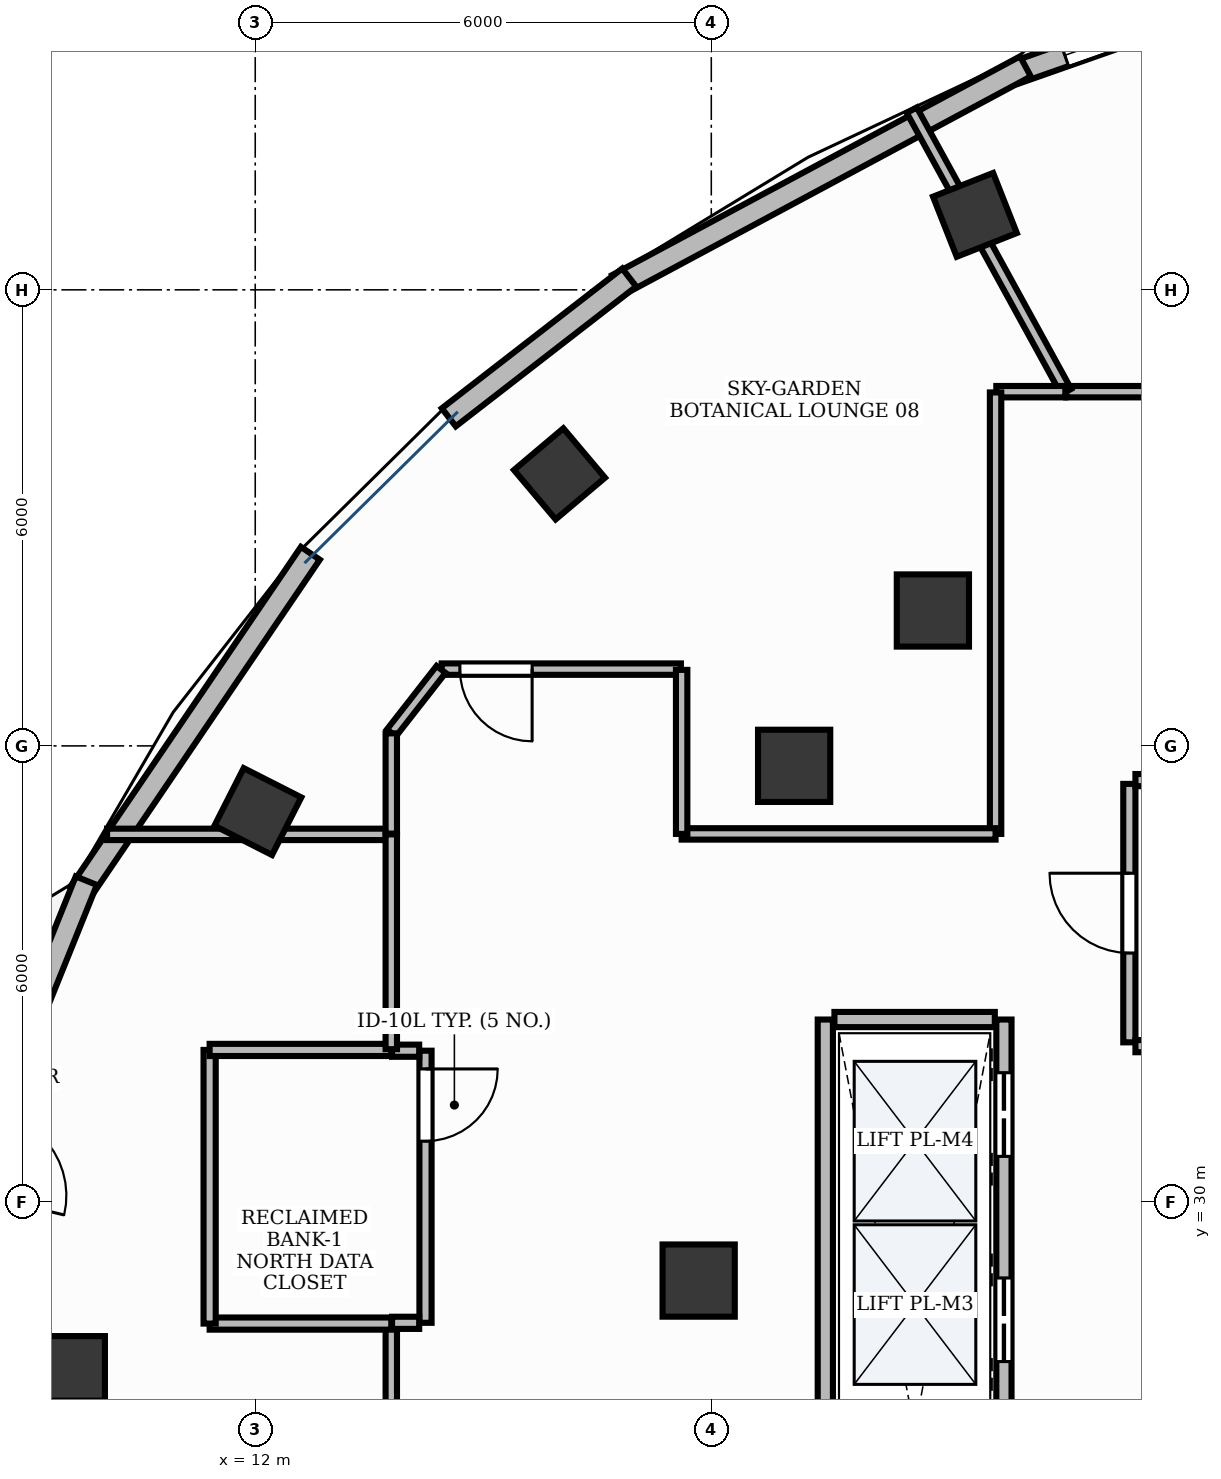
"""IFC4 building model, lengths in metres.
Left out: names, types, materials, properties, quantities, classifications, styles, units other than length and angle.
Written with IfcOpenShell. Run it as: python <this file> out.ifc"""

import sys

from ifc_helpers import new_model, si_unit, direction, frame, frame_2d, origin, origin_2d, place, context, subcontext, project, spatial, rectangle, extrude, element, fill, save


model = new_model("IFC4")
c1 = context("Model", 3, precision=1e-05, world=origin(), true_north=direction((0.0, 1.0)))
c2 = subcontext(c1, "Body", "Model", "MODEL_VIEW")
j1 = project(units=[si_unit("LENGTHUNIT", "METRE"), si_unit("PLANEANGLEUNIT", "RADIAN")], contexts=[c1])
p1 = place(None, origin())
s1 = spatial("IfcSite", under=j1, at=p1, CompositionType="ELEMENT")
p2 = place(p1, origin())
s2 = spatial("IfcBuilding", under=s1, at=p2, CompositionType="ELEMENT")
p3 = place(p2, frame((0.0, 0.0, 273.0)))
s3 = spatial("IfcBuildingStorey", under=s2, at=p3, CompositionType="ELEMENT", Elevation=273.0)
for number, where, z_axis, x_axis in (
    (1, (21.469, 42.986, -0.0), (0.0, 0.0, 1.0), (0.93, 0.367, 0.0)),
    (2, (16.003, 39.579, -0.0), (0.0, 0.0, 1.0), (0.764, 0.645, 0.0)),
):
    element("IfcColumn", number, at=place(p3, frame(where, z_axis=z_axis, x_axis=x_axis)), inside=s3, PredefinedType="COLUMN", context=c2, shape_type="SweptSolid", body=[
        extrude(rectangle(XDim=0.85, YDim=0.85, at=origin_2d()), origin(), (0.0, 0.0, 1.0), 3.881),
    ])
p4 = place(p3, frame((20.915, 37.781, -0.0), z_axis=(0.0, 0.0, 1.0), x_axis=(1.0, 0.0, 0.0)))
e3 = element("IfcColumn", 3, at=p4, inside=s3, PredefinedType="COLUMN", context=c2, shape_type="SweptSolid", body=[
    extrude(rectangle(XDim=0.95, YDim=0.95, at=origin_2d()), origin(), (0.0, 0.0, 1.0), 3.881),
])
p5 = place(p3, frame((12.034, 35.136, -0.0), z_axis=(0.0, 0.0, 1.0), x_axis=(0.453057191132, 0.891481453292, 0.0)))
e4 = element("IfcColumn", 4, at=p5, inside=s3, PredefinedType="COLUMN", context=c2, shape_type="SweptSolid", body=[
    extrude(rectangle(XDim=0.85, YDim=0.85, at=origin_2d()), origin(), (0.0, 0.0, 1.0), 3.881),
])
p6 = place(p3, frame((19.09, 35.738, -0.0), z_axis=(0.0, 0.0, 1.0), x_axis=(1.0, 0.0, 0.0)))
e5 = element("IfcColumn", 5, at=p6, inside=s3, PredefinedType="COLUMN", context=c2, shape_type="SweptSolid", body=[
    extrude(rectangle(XDim=0.95, YDim=0.95, at=origin_2d()), origin(), (0.0, 0.0, 1.0), 3.881),
])
p7 = place(p3, frame((9.597, 27.81, -0.0), z_axis=(0.0, 0.0, 1.0), x_axis=(0.0, 1.0, 0.0)))
e6 = element("IfcColumn", 6, at=p7, inside=s3, PredefinedType="COLUMN", context=c2, shape_type="SweptSolid", body=[
    extrude(rectangle(XDim=0.85, YDim=0.85, at=origin_2d()), origin(), (0.0, 0.0, 1.0), 3.881),
])
p8 = place(p3, frame((17.834, 28.966, -0.0), z_axis=(0.0, 0.0, 1.0), x_axis=(1.0, 0.0, 0.0)))
e7 = element("IfcColumn", 7, at=p8, inside=s3, PredefinedType="COLUMN", context=c2, shape_type="SweptSolid", body=[
    extrude(rectangle(XDim=0.95, YDim=0.95, at=origin_2d()), origin(), (0.0, 0.0, 1.0), 3.881),
])
p9 = place(p3, frame((25.008, 45.913, 0.0), z_axis=(0.0, 0.0, 1.0), x_axis=(-0.943473052448, -0.331449240917, 0.0)))
e8 = element("IfcWall", 8, at=p9, inside=s3, PredefinedType="STANDARD", context=c2, shape_type="SweptSolid", body=[
    extrude(rectangle(XDim=3.196, YDim=0.3, at=frame_2d((1.598, 0.0))), origin(), (0.0, 0.0, 1.0), 3.88),
])
p10 = place(p9, frame((0.698, 0.0, 0.9)))
e9 = element("IfcOpeningElement", 9, at=p10, cuts=e8, PredefinedType="OPENING", context=c2, shape_type="SweptSolid", body=[
    extrude(rectangle(XDim=1.8, YDim=2.1, at=frame_2d((0.9, 1.05))), frame((0.0, 0.165, 0.0), z_axis=(0.0, -1.0, 0.0), x_axis=(1.0, 0.0, 0.0)), (0.0, 0.0, 1.0), 0.33),
])
p11 = place(p3, frame((22.133, 44.939, 0.0), z_axis=(0.0, 0.0, 1.0), x_axis=(-0.881337457, -0.472487340454, 0.0)))
e10 = element("IfcWall", 10, at=p11, inside=s3, PredefinedType="STANDARD", context=c2, shape_type="SweptSolid", body=[
    extrude(rectangle(XDim=6.088, YDim=0.3, at=frame_2d((3.044, 0.0))), origin(), (0.0, 0.0, 1.0), 3.88),
])
p12 = place(p3, frame((16.92, 42.162, 0.0), z_axis=(0.0, 0.0, 1.0), x_axis=(-0.790506568463, -0.612453561682, 0.0)))
e11 = element("IfcWall", 11, at=p12, inside=s3, PredefinedType="STANDARD", context=c2, shape_type="SweptSolid", body=[
    extrude(rectangle(XDim=3.003, YDim=0.3, at=frame_2d((1.501, 0.0))), origin(), (0.0, 0.0, 1.0), 3.88),
])
p13 = place(p3, frame((12.725, 38.534, 0.0), z_axis=(0.0, 0.0, 1.0), x_axis=(-0.561547791281, -0.827444305139, 0.0)))
e12 = element("IfcWall", 12, at=p13, inside=s3, PredefinedType="STANDARD", context=c2, shape_type="SweptSolid", body=[
    extrude(rectangle(XDim=5.407, YDim=0.3, at=frame_2d((2.704, 0.0))), origin(), (0.0, 0.0, 1.0), 3.88),
])
p14 = place(p3, frame((9.778, 34.227, 0.0), z_axis=(0.0, 0.0, 1.0), x_axis=(-0.373974639596, -0.927438930032, 0.0)))
e13 = element("IfcWall", 13, at=p14, inside=s3, PredefinedType="STANDARD", context=c2, shape_type="SweptSolid", body=[
    extrude(rectangle(XDim=2.686, YDim=0.3, at=frame_2d((1.343, 0.0))), origin(), (0.0, 0.0, 1.0), 3.88),
])
p15 = place(p3, frame((19.5, 21.6, 0.0), z_axis=(0.0, 0.0, 1.0), x_axis=(0.0, 1.0, 0.0)))
e14 = element("IfcWall", 14, at=p15, inside=s3, PredefinedType="PARTITIONING", context=c2, shape_type="SweptSolid", body=[
    extrude(rectangle(XDim=10.8, YDim=0.2, at=frame_2d((5.4, 0.0))), origin(), (0.0, 0.0, 1.0), 2.89),
])
p16 = place(p3, frame((21.85, 21.6, 0.0), z_axis=(0.0, 0.0, 1.0), x_axis=(0.0, 1.0, 0.0)))
e15 = element("IfcWall", 15, at=p16, inside=s3, PredefinedType="PARTITIONING", context=c2, shape_type="SweptSolid", body=[
    extrude(rectangle(XDim=10.8, YDim=0.2, at=frame_2d((5.4, 0.0))), origin(), (0.0, 0.0, 1.0), 2.89),
])
p17 = place(p16, frame((0.9, 0.0, 0.0)))
e16 = element("IfcOpeningElement", 16, at=p17, cuts=e15, PredefinedType="OPENING", context=c2, shape_type="SweptSolid", body=[
    extrude(rectangle(XDim=1.1, YDim=2.2, at=frame_2d((0.55, 1.1))), frame((0.0, 0.115, 0.0), z_axis=(0.0, -1.0, 0.0), x_axis=(1.0, 0.0, 0.0)), (0.0, 0.0, 1.0), 0.23),
])
p18 = place(p16, frame((3.6, 0.0, 0.0)))
e17 = element("IfcOpeningElement", 17, at=p18, cuts=e15, PredefinedType="OPENING", context=c2, shape_type="SweptSolid", body=[
    extrude(rectangle(XDim=1.1, YDim=2.2, at=frame_2d((0.55, 1.1))), frame((0.0, 0.115, 0.0), z_axis=(0.0, -1.0, 0.0), x_axis=(1.0, 0.0, 0.0)), (0.0, 0.0, 1.0), 0.23),
])
p19 = place(p16, frame((6.3, 0.0, 0.0)))
e18 = element("IfcOpeningElement", 18, at=p19, cuts=e15, PredefinedType="OPENING", context=c2, shape_type="SweptSolid", body=[
    extrude(rectangle(XDim=1.1, YDim=2.2, at=frame_2d((0.55, 1.1))), frame((0.0, 0.115, 0.0), z_axis=(0.0, -1.0, 0.0), x_axis=(1.0, 0.0, 0.0)), (0.0, 0.0, 1.0), 0.23),
])
p20 = place(p16, frame((9.0, 0.0, 0.0)))
e19 = element("IfcOpeningElement", 19, at=p20, cuts=e15, PredefinedType="OPENING", context=c2, shape_type="SweptSolid", body=[
    extrude(rectangle(XDim=1.1, YDim=2.2, at=frame_2d((0.55, 1.1))), frame((0.0, 0.115, 0.0), z_axis=(0.0, -1.0, 0.0), x_axis=(1.0, 0.0, 0.0)), (0.0, 0.0, 1.0), 0.23),
])
p21 = place(p3, frame((19.62, 32.4, 0.0), z_axis=(0.0, 0.0, 1.0), x_axis=(1.0, 0.0, 0.0)))
e20 = element("IfcWall", 20, at=p21, inside=s3, PredefinedType="PARTITIONING", context=c2, shape_type="SweptSolid", body=[
    extrude(rectangle(XDim=2.11, YDim=0.2, at=frame_2d((1.055, 0.0))), origin(), (0.0, 0.0, 1.0), 2.89),
])
p22 = place(p3, frame((23.5, 32.1, 0.0), z_axis=(0.0, 0.0, 1.0), x_axis=(0.0, 1.0, 0.0)))
e21 = element("IfcWall", 21, at=p22, inside=s3, PredefinedType="PARTITIONING", context=c2, shape_type="SweptSolid", body=[
    extrude(rectangle(XDim=3.4, YDim=0.16, at=frame_2d((1.7, 0.0))), origin(), (0.0, 0.0, 1.0), 2.89),
])
p23 = place(p22, frame((1.175, 0.0, 0.0)))
e22 = element("IfcOpeningElement", 22, at=p23, cuts=e21, PredefinedType="OPENING", context=c2, shape_type="SweptSolid", body=[
    extrude(rectangle(XDim=1.05, YDim=2.15, at=frame_2d((0.525, 1.075))), frame((0.0, 0.095, 0.0), z_axis=(0.0, -1.0, 0.0), x_axis=(1.0, 0.0, 0.0)), (0.0, 0.0, 1.0), 0.19),
])
p24 = place(p3, frame((23.58, 32.05, 0.0), z_axis=(0.0, 0.0, 1.0), x_axis=(1.0, 0.0, 0.0)))
e23 = element("IfcWall", 23, at=p24, inside=s3, PredefinedType="PARTITIONING", context=c2, shape_type="SweptSolid", body=[
    extrude(rectangle(XDim=4.97, YDim=0.16, at=frame_2d((2.485, 0.0))), origin(), (0.0, 0.0, 1.0), 2.89),
])
p25 = place(p3, frame((23.58, 35.55, 0.0), z_axis=(0.0, 0.0, 1.0), x_axis=(1.0, 0.0, 0.0)))
e24 = element("IfcWall", 24, at=p25, inside=s3, PredefinedType="PARTITIONING", context=c2, shape_type="SweptSolid", body=[
    extrude(rectangle(XDim=2.12, YDim=0.16, at=frame_2d((1.06, 0.0))), origin(), (0.0, 0.0, 1.0), 2.89),
])
p26 = place(p3, frame((14.24, 31.99, 0.0), z_axis=(0.0, 0.0, 1.0), x_axis=(0.0, -1.0, 0.0)))
e25 = element("IfcWall", 25, at=p26, inside=s3, PredefinedType="PARTITIONING", context=c2, shape_type="SweptSolid", body=[
    extrude(rectangle(XDim=3.58, YDim=0.16, at=frame_2d((1.79, 0.0))), origin(), (0.0, 0.0, 1.0), 2.89),
])
p27 = place(p26, frame((0.24, 0.0, 0.0)))
e26 = element("IfcOpeningElement", 26, at=p27, cuts=e25, PredefinedType="OPENING", context=c2, shape_type="SweptSolid", body=[
    extrude(rectangle(XDim=0.95, YDim=2.15, at=frame_2d((0.475, 1.075))), frame((0.0, 0.095, 0.0), z_axis=(0.0, -1.0, 0.0), x_axis=(1.0, 0.0, 0.0)), (0.0, 0.0, 1.0), 0.19),
])
p28 = place(p3, frame((31.806, 40.66, 0.0), z_axis=(0.0, 0.0, 1.0), x_axis=(-1.0, 0.0, 0.0)))
e27 = element("IfcWall", 27, at=p28, inside=s3, PredefinedType="PARTITIONING", context=c2, shape_type="SweptSolid", body=[
    extrude(rectangle(XDim=9.136, YDim=0.15, at=frame_2d((4.568, 0.0))), origin(), (0.0, 0.0, 1.0), 2.89),
])
p29 = place(p28, frame((0.257, 0.0, 0.0)))
e28 = element("IfcOpeningElement", 28, at=p29, cuts=e27, PredefinedType="OPENING", context=c2, shape_type="SweptSolid", body=[
    extrude(rectangle(XDim=0.95, YDim=2.15, at=frame_2d((0.475, 1.075))), frame((0.0, 0.09, 0.0), z_axis=(0.0, -1.0, 0.0), x_axis=(1.0, 0.0, 0.0)), (0.0, 0.0, 1.0), 0.18),
])
p30 = place(p3, frame((13.79, 28.39, 0.0), z_axis=(0.0, 0.0, 1.0), x_axis=(0.0, -1.0, 0.0)))
e29 = element("IfcWall", 29, at=p30, inside=s3, PredefinedType="PARTITIONING", context=c2, shape_type="SweptSolid", body=[
    extrude(rectangle(XDim=10.555, YDim=0.15, at=frame_2d((5.277, 0.0))), origin(), (0.0, 0.0, 1.0), 2.89),
])
p31 = place(p30, frame((1.612, 0.0, 0.0)))
e30 = element("IfcOpeningElement", 30, at=p31, cuts=e29, PredefinedType="OPENING", context=c2, shape_type="SweptSolid", body=[
    extrude(rectangle(XDim=0.95, YDim=2.15, at=frame_2d((0.475, 1.075))), frame((0.0, 0.09, 0.0), z_axis=(0.0, -1.0, 0.0), x_axis=(1.0, 0.0, 0.0)), (0.0, 0.0, 1.0), 0.18),
])
p32 = place(p3, frame((17.6, 37.01, 0.0), z_axis=(0.0, 0.0, 1.0), x_axis=(-1.0, 0.0, 0.0)))
e31 = element("IfcWall", 31, at=p32, inside=s3, PredefinedType="PARTITIONING", context=c2, shape_type="SweptSolid", body=[
    extrude(rectangle(XDim=3.147, YDim=0.15, at=frame_2d((1.574, 0.0))), origin(), (0.0, 0.0, 1.0), 2.89),
])
p33 = place(p32, frame((1.957, 0.0, 0.0)))
e32 = element("IfcOpeningElement", 32, at=p33, cuts=e31, PredefinedType="OPENING", context=c2, shape_type="SweptSolid", body=[
    extrude(rectangle(XDim=0.95, YDim=2.15, at=frame_2d((0.475, 1.075))), frame((0.0, 0.09, 0.0), z_axis=(0.0, -1.0, 0.0), x_axis=(1.0, 0.0, 0.0)), (0.0, 0.0, 1.0), 0.18),
])
for number, where, z_axis, x_axis in (
    (33, (13.8, 31.99, 0.0), (0.0, 0.0, 1.0), (1.0, 0.0, 0.0)),
    (34, (14.157, 28.41, 0.0), (0.0, 0.0, 1.0), (-1.0, 0.0, 0.0)),
):
    element("IfcWall", number, at=place(p3, frame(where, z_axis=z_axis, x_axis=x_axis)), inside=s3, PredefinedType="PARTITIONING", context=c2, shape_type="SweptSolid", body=[
        extrude(rectangle(XDim=0.357, YDim=0.16, at=frame_2d((0.178, 0.0))), origin(), (0.0, 0.0, 1.0), 2.89),
    ])
p34 = place(p3, frame((13.79, 28.4, 0.0), z_axis=(0.0, 0.0, 1.0), x_axis=(-1.0, 0.0, 0.0)))
e35 = element("IfcWall", 35, at=p34, inside=s3, PredefinedType="PARTITIONING", context=c2, shape_type="SweptSolid", body=[
    extrude(rectangle(XDim=2.39, YDim=0.16, at=frame_2d((1.195, 0.0))), origin(), (0.0, 0.0, 1.0), 2.89),
])
p35 = place(p3, frame((11.4, 28.4, 0.0), z_axis=(0.0, 0.0, 1.0), x_axis=(0.0, 1.0, 0.0)))
e36 = element("IfcWall", 36, at=p35, inside=s3, PredefinedType="PARTITIONING", context=c2, shape_type="SweptSolid", body=[
    extrude(rectangle(XDim=3.6, YDim=0.16, at=frame_2d((1.8, 0.0))), origin(), (0.0, 0.0, 1.0), 2.89),
])
p36 = place(p3, frame((11.4, 32.0, 0.0), z_axis=(0.0, 0.0, 1.0), x_axis=(1.0, 0.0, 0.0)))
e37 = element("IfcWall", 37, at=p36, inside=s3, PredefinedType="PARTITIONING", context=c2, shape_type="SweptSolid", body=[
    extrude(rectangle(XDim=2.39, YDim=0.16, at=frame_2d((1.195, 0.0))), origin(), (0.0, 0.0, 1.0), 2.89),
])
p37 = place(p3, frame((22.669, 40.66, 0.0), z_axis=(0.0, 0.0, 1.0), x_axis=(-0.480944413436, 0.8767510885, 0.0)))
e38 = element("IfcWall", 38, at=p37, inside=s3, PredefinedType="PARTITIONING", context=c2, shape_type="SweptSolid", body=[
    extrude(rectangle(XDim=4.224, YDim=0.15, at=frame_2d((2.112, 0.0))), origin(), (0.0, 0.0, 1.0), 2.89),
])
p38 = place(p3, frame((10.051, 34.836, 0.0), z_axis=(0.0, 0.0, 1.0), x_axis=(1.0, 0.0, 0.0)))
e39 = element("IfcWall", 39, at=p38, inside=s3, PredefinedType="PARTITIONING", context=c2, shape_type="SweptSolid", body=[
    extrude(rectangle(XDim=3.739, YDim=0.15, at=frame_2d((1.87, 0.0))), origin(), (0.0, 0.0, 1.0), 2.89),
])
p39 = place(p3, frame((13.79, 34.836, 0.0), z_axis=(0.0, 0.0, 1.0), x_axis=(0.0, -1.0, 0.0)))
e40 = element("IfcWall", 40, at=p39, inside=s3, PredefinedType="PARTITIONING", context=c2, shape_type="SweptSolid", body=[
    extrude(rectangle(XDim=2.826, YDim=0.15, at=frame_2d((1.413, 0.0))), origin(), (0.0, 0.0, 1.0), 2.89),
])
p40 = place(p3, frame((22.658, 40.66, 0.0), z_axis=(0.0, 0.0, 1.0), x_axis=(-1.0, 0.0, 0.0)))
e41 = element("IfcWall", 41, at=p40, inside=s3, PredefinedType="PARTITIONING", context=c2, shape_type="SweptSolid", body=[
    extrude(rectangle(XDim=0.908, YDim=0.15, at=frame_2d((0.454, 0.0))), origin(), (0.0, 0.0, 1.0), 2.89),
])
p41 = place(p3, frame((21.74, 40.65, 0.0), z_axis=(0.0, 0.0, 1.0), x_axis=(0.0, -1.0, 0.0)))
e42 = element("IfcWall", 42, at=p41, inside=s3, PredefinedType="PARTITIONING", context=c2, shape_type="SweptSolid", body=[
    extrude(rectangle(XDim=5.808, YDim=0.15, at=frame_2d((2.904, 0.0))), origin(), (0.0, 0.0, 1.0), 2.89),
])
p42 = place(p3, frame((21.74, 34.842, 0.0), z_axis=(0.0, 0.0, 1.0), x_axis=(-1.0, 0.0, 0.0)))
e43 = element("IfcWall", 43, at=p42, inside=s3, PredefinedType="PARTITIONING", context=c2, shape_type="SweptSolid", body=[
    extrude(rectangle(XDim=4.13, YDim=0.15, at=frame_2d((2.065, 0.0))), origin(), (0.0, 0.0, 1.0), 2.89),
])
p43 = place(p3, frame((17.61, 34.842, 0.0), z_axis=(0.0, 0.0, 1.0), x_axis=(0.0, 1.0, 0.0)))
e44 = element("IfcWall", 44, at=p43, inside=s3, PredefinedType="PARTITIONING", context=c2, shape_type="SweptSolid", body=[
    extrude(rectangle(XDim=2.158, YDim=0.15, at=frame_2d((1.079, 0.0))), origin(), (0.0, 0.0, 1.0), 2.89),
])
p44 = place(p3, frame((14.445, 37.006, 0.0), z_axis=(0.0, 0.0, 1.0), x_axis=(-0.615836200745, -0.787874211948, 0.0)))
e45 = element("IfcWall", 45, at=p44, inside=s3, PredefinedType="PARTITIONING", context=c2, shape_type="SweptSolid", body=[
    extrude(rectangle(XDim=1.06, YDim=0.15, at=frame_2d((0.53, 0.0))), origin(), (0.0, 0.0, 1.0), 2.89),
])
p45 = place(p3, frame((13.79, 36.165, 0.0), z_axis=(0.0, 0.0, 1.0), x_axis=(0.0, -1.0, 0.0)))
e46 = element("IfcWall", 46, at=p45, inside=s3, PredefinedType="PARTITIONING", context=c2, shape_type="SweptSolid", body=[
    extrude(rectangle(XDim=1.319, YDim=0.15, at=frame_2d((0.659, 0.0))), origin(), (0.0, 0.0, 1.0), 2.89),
])
p46 = place(p10, origin())
e47 = element("IfcWindow", 47, at=p46, inside=s3, PartitioningType="SINGLE_PANEL", PredefinedType="WINDOW", context=c2, shape_type="SweptSolid", body=[
    extrude(rectangle(XDim=1.8, YDim=2.1, at=frame_2d((0.9, 1.05))), frame((0.0, 0.03, 0.0), z_axis=(0.0, -1.0, 0.0), x_axis=(1.0, 0.0, 0.0)), (0.0, 0.0, 1.0), 0.06),
])
fill(e9, e47)
p47 = place(p19, origin())
e48 = element("IfcDoor", 48, at=p47, inside=s3, OperationType="DOUBLE_DOOR_SLIDING", PredefinedType="DOOR", context=c2, shape_type="SweptSolid", body=[
    extrude(rectangle(XDim=1.1, YDim=2.2, at=frame_2d((0.55, 1.1))), frame((0.0, 0.025, 0.0), z_axis=(0.0, -1.0, 0.0), x_axis=(1.0, 0.0, 0.0)), (0.0, 0.0, 1.0), 0.05),
])
fill(e18, e48)
p48 = place(p20, origin())
e49 = element("IfcDoor", 49, at=p48, inside=s3, OperationType="DOUBLE_DOOR_SLIDING", PredefinedType="DOOR", context=c2, shape_type="SweptSolid", body=[
    extrude(rectangle(XDim=1.1, YDim=2.2, at=frame_2d((0.55, 1.1))), frame((0.0, 0.025, 0.0), z_axis=(0.0, -1.0, 0.0), x_axis=(1.0, 0.0, 0.0)), (0.0, 0.0, 1.0), 0.05),
])
fill(e19, e49)
p49 = place(p23, origin())
e50 = element("IfcDoor", 50, at=p49, inside=s3, OperationType="SINGLE_SWING_RIGHT", PredefinedType="DOOR", context=c2, shape_type="SweptSolid", body=[
    extrude(rectangle(XDim=1.05, YDim=2.15, at=frame_2d((0.525, 1.075))), frame((0.0, 0.025, 0.0), z_axis=(0.0, -1.0, 0.0), x_axis=(1.0, 0.0, 0.0)), (0.0, 0.0, 1.0), 0.05),
])
fill(e22, e50)
p50 = place(p27, origin())
e51 = element("IfcDoor", 51, at=p50, inside=s3, OperationType="SINGLE_SWING_LEFT", PredefinedType="DOOR", context=c2, shape_type="SweptSolid", body=[
    extrude(rectangle(XDim=0.95, YDim=2.15, at=frame_2d((0.475, 1.075))), frame((0.0, 0.025, 0.0), z_axis=(0.0, -1.0, 0.0), x_axis=(1.0, 0.0, 0.0)), (0.0, 0.0, 1.0), 0.05),
])
fill(e26, e51)
p51 = place(p33, origin())
e52 = element("IfcDoor", 52, at=p51, inside=s3, OperationType="SINGLE_SWING_LEFT", PredefinedType="DOOR", context=c2, shape_type="SweptSolid", body=[
    extrude(rectangle(XDim=0.95, YDim=2.15, at=frame_2d((0.475, 1.075))), frame((0.0, 0.025, 0.0), z_axis=(0.0, -1.0, 0.0), x_axis=(1.0, 0.0, 0.0)), (0.0, 0.0, 1.0), 0.05),
])
fill(e32, e52)
save(model, sys.argv[1])
